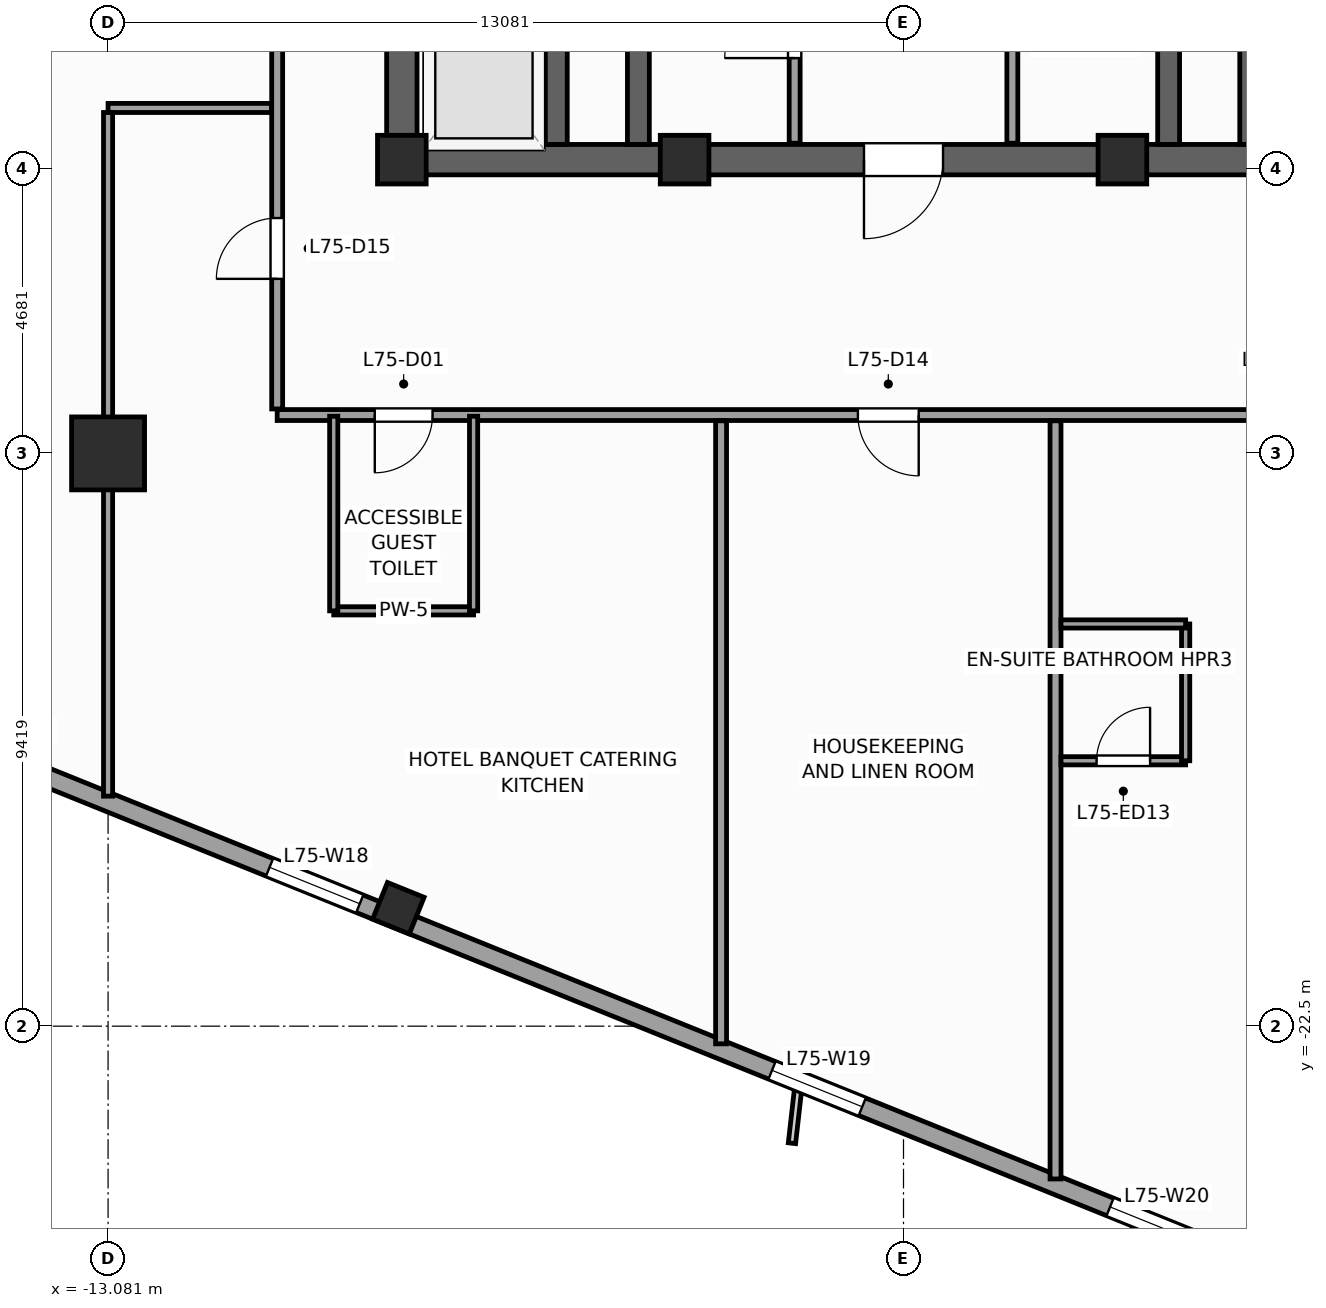
"""IFC4 building model, lengths in metres.
Left out: names, types, materials, properties, quantities, classifications, styles, units other than length and angle.
Written with IfcOpenShell. Run it as: python <this file> out.ifc"""

import sys

from ifc_helpers import new_model, si_unit, direction, frame, frame_2d, origin, origin_2d, place, context, subcontext, project, spatial, rectangle, extrude, source, transform, mapped, element, fill, save


model = new_model("IFC4")
c1 = context("Model", 3, precision=1e-05, world=origin(), true_north=direction((0.0, 1.0)))
c2 = subcontext(c1, "Body", "Model", "MODEL_VIEW")
j1 = project(units=[si_unit("LENGTHUNIT", "METRE"), si_unit("PLANEANGLEUNIT", "RADIAN")], contexts=[c1])
p1 = place(None, origin())
s1 = spatial("IfcSite", under=j1, at=p1, CompositionType="ELEMENT")
p2 = place(p1, origin())
s2 = spatial("IfcBuilding", under=s1, at=p2, CompositionType="ELEMENT")
p3 = place(p2, frame((0.0, 0.0, 304.8)))
s3 = spatial("IfcBuildingStorey", under=s2, at=p3, CompositionType="ELEMENT", Elevation=304.8)
p4 = place(p3, frame((-8.5, -8.25, 0.0), z_axis=(0.0, 0.0, 1.0), x_axis=(1.0, 0.0, 0.0)))
e1 = element("IfcWall", 1, at=p4, inside=s3, PredefinedType="SHEAR", context=c2, shape_type="SweptSolid", body=[
    extrude(rectangle(XDim=17.0, YDim=0.5, at=frame_2d((8.5, 0.0))), origin(), (0.0, 0.0, 1.0), 3.6),
])
p5 = place(p4, frame((7.85, 0.0, 0.0)))
e2 = element("IfcOpeningElement", 2, at=p5, cuts=e1, PredefinedType="OPENING", context=c2, shape_type="SweptSolid", body=[
    extrude(rectangle(XDim=1.3, YDim=2.2, at=frame_2d((0.65, 1.1))), frame((0.0, 0.26, 0.0), z_axis=(0.0, -1.0, 0.0), x_axis=(1.0, 0.0, 0.0)), (0.0, 0.0, 1.0), 0.52),
])
p6 = place(p3, frame((-8.25, -8.0, 0.0), z_axis=(0.0, 0.0, 1.0), x_axis=(0.0, 1.0, 0.0)))
e3 = element("IfcWall", 3, at=p6, inside=s3, PredefinedType="SHEAR", context=c2, shape_type="SweptSolid", body=[
    extrude(rectangle(XDim=16.0, YDim=0.5, at=frame_2d((8.0, 0.0))), origin(), (0.0, 0.0, 1.0), 3.6),
])
p7 = place(p6, frame((4.69, 0.0, 0.0)))
e4 = element("IfcOpeningElement", 4, at=p7, cuts=e3, PredefinedType="OPENING", context=c2, shape_type="SweptSolid", body=[
    extrude(rectangle(XDim=1.3, YDim=2.2, at=frame_2d((0.65, 1.1))), frame((0.0, 0.26, 0.0), z_axis=(0.0, -1.0, 0.0), x_axis=(1.0, 0.0, 0.0)), (0.0, 0.0, 1.0), 0.52),
])
for number, where, z_axis, x_axis in (
    (5, (-4.36, -8.0, 0.0), (0.0, 0.0, 1.0), (0.0, 1.0, 0.0)),
    (6, (4.36, -8.0, 0.0), (0.0, 0.0, 1.0), (0.0, 1.0, 0.0)),
):
    element("IfcWall", number, at=place(p3, frame(where, z_axis=z_axis, x_axis=x_axis)), inside=s3, PredefinedType="SHEAR", context=c2, shape_type="SweptSolid", body=[
        extrude(rectangle(XDim=16.0, YDim=0.36, at=frame_2d((8.0, 0.0))), origin(), (0.0, 0.0, 1.0), 3.6),
    ])
for number, where, z_axis, x_axis in (
    (7, (-5.71, -8.0, 0.0), (0.0, 0.0, 1.0), (0.0, 1.0, 0.0)),
    (8, (5.71, -8.0, 0.0), (0.0, 0.0, 1.0), (0.0, 1.0, 0.0)),
):
    element("IfcWall", number, at=place(p3, frame(where, z_axis=z_axis, x_axis=x_axis)), inside=s3, PredefinedType="SHEAR", context=c2, shape_type="SweptSolid", body=[
        extrude(rectangle(XDim=2.54, YDim=0.36, at=frame_2d((1.27, 0.0))), origin(), (0.0, 0.0, 1.0), 3.6),
    ])
m1 = source(origin(), c2, "Body", "SweptSolid", [
    extrude(rectangle(XDim=0.8, YDim=0.8, at=origin_2d()), origin(), (0.0, 0.0, 1.0), 3.6),
])
for number, where, z_axis, x_axis in (
    (9, (-8.25, -8.25, 0.0), (0.0, 0.0, 1.0), (1.0, 0.0, 0.0)),
    (10, (-3.6, -8.25, 0.0), (0.0, 0.0, 1.0), (1.0, 0.0, 0.0)),
    (11, (3.6, -8.25, 0.0), (0.0, 0.0, 1.0), (1.0, 0.0, 0.0)),
):
    element("IfcColumn", number, at=place(p3, frame(where, z_axis=z_axis, x_axis=x_axis)), inside=s3, PredefinedType="PILASTER", context=c2, shape_type="MappedRepresentation", body=[
        mapped(m1, transform((0.0, 0.0, 0.0), scale=1.0)),
    ])
m2 = source(origin(), c2, "Body", "SweptSolid", [
    extrude(rectangle(XDim=1.2, YDim=1.2, at=origin_2d()), origin(), (0.0, 0.0, 1.0), 3.6),
])
p8 = place(p3, frame((-13.081, -13.081, 0.0), z_axis=(0.0, 0.0, 1.0), x_axis=(1.0, 0.0, 0.0)))
e12 = element("IfcColumn", 12, at=p8, inside=s3, PredefinedType="COLUMN", context=c2, shape_type="MappedRepresentation", body=[
    mapped(m2, transform((0.0, 0.0, 0.0), scale=1.0)),
])
m3 = source(origin(), c2, "Body", "SweptSolid", [
    extrude(rectangle(XDim=0.65, YDim=0.65, at=origin_2d()), origin(), (0.0, 0.0, 1.0), 3.6),
])
p9 = place(p3, frame((-8.307, -20.56, 0.0), z_axis=(0.0, 0.0, 1.0), x_axis=(0.374606593416, 0.927183854567, 0.0)))
e13 = element("IfcColumn", 13, at=p9, inside=s3, PredefinedType="COLUMN", context=c2, shape_type="MappedRepresentation", body=[
    mapped(m3, transform((0.0, 0.0, 0.0), scale=1.0)),
])
p10 = place(p3, frame((-23.813, -14.479, 0.0), z_axis=(0.0, 0.0, 1.0), x_axis=(0.927182657188, -0.374609557019, 0.0)))
e14 = element("IfcWall", 14, at=p10, inside=s3, PredefinedType="STANDARD", context=c2, shape_type="SweptSolid", body=[
    extrude(rectangle(XDim=33.31, YDim=0.31, at=frame_2d((16.655, 0.0))), origin(), (0.0, 0.0, 1.0), 2.75),
])
p11 = place(p10, frame((3.197, 0.0, 0.47)))
e15 = element("IfcOpeningElement", 15, at=p11, cuts=e14, PredefinedType="OPENING", context=c2, shape_type="SweptSolid", body=[
    extrude(rectangle(XDim=1.6, YDim=2.1, at=frame_2d((0.8, 1.05))), frame((0.0, 0.165, 0.0), z_axis=(0.0, -1.0, 0.0), x_axis=(1.0, 0.0, 0.0)), (0.0, 0.0, 1.0), 0.33),
])
p12 = place(p10, frame((8.86, 0.0, 0.47)))
e16 = element("IfcOpeningElement", 16, at=p12, cuts=e14, PredefinedType="OPENING", context=c2, shape_type="SweptSolid", body=[
    extrude(rectangle(XDim=1.6, YDim=2.1, at=frame_2d((0.8, 1.05))), frame((0.0, 0.165, 0.0), z_axis=(0.0, -1.0, 0.0), x_axis=(1.0, 0.0, 0.0)), (0.0, 0.0, 1.0), 0.33),
])
p13 = place(p10, frame((14.439, 0.0, 0.47)))
e17 = element("IfcOpeningElement", 17, at=p13, cuts=e14, PredefinedType="OPENING", context=c2, shape_type="SweptSolid", body=[
    extrude(rectangle(XDim=1.6, YDim=2.1, at=frame_2d((0.8, 1.05))), frame((0.0, 0.165, 0.0), z_axis=(0.0, -1.0, 0.0), x_axis=(1.0, 0.0, 0.0)), (0.0, 0.0, 1.0), 0.33),
])
p14 = place(p10, frame((23.351, 0.0, 0.47)))
e18 = element("IfcOpeningElement", 18, at=p14, cuts=e14, PredefinedType="OPENING", context=c2, shape_type="SweptSolid", body=[
    extrude(rectangle(XDim=1.6, YDim=2.1, at=frame_2d((0.8, 1.05))), frame((0.0, 0.165, 0.0), z_axis=(0.0, -1.0, 0.0), x_axis=(1.0, 0.0, 0.0)), (0.0, 0.0, 1.0), 0.33),
])
p15 = place(p10, frame((29.347, 0.0, 0.47)))
e19 = element("IfcOpeningElement", 19, at=p15, cuts=e14, PredefinedType="OPENING", context=c2, shape_type="SweptSolid", body=[
    extrude(rectangle(XDim=1.6, YDim=2.1, at=frame_2d((0.8, 1.05))), frame((0.0, 0.165, 0.0), z_axis=(0.0, -1.0, 0.0), x_axis=(1.0, 0.0, 0.0)), (0.0, 0.0, 1.0), 0.33),
])
p16 = place(p3, frame((-1.79, -7.98, 0.0), z_axis=(0.0, 0.0, 1.0), x_axis=(0.0, 1.0, 0.0)))
e20 = element("IfcWall", 20, at=p16, inside=s3, PredefinedType="PARTITIONING", context=c2, shape_type="SweptSolid", body=[
    extrude(rectangle(XDim=12.38, YDim=0.18, at=frame_2d((6.19, 0.0))), origin(), (0.0, 0.0, 1.0), 3.35),
])
p17 = place(p16, frame((8.8, 0.0, 0.0)))
e21 = element("IfcOpeningElement", 21, at=p17, cuts=e20, PredefinedType="OPENING", context=c2, shape_type="SweptSolid", body=[
    extrude(rectangle(XDim=1.1, YDim=2.2, at=frame_2d((0.55, 1.1))), frame((0.0, 0.1, 0.0), z_axis=(0.0, -1.0, 0.0), x_axis=(1.0, 0.0, 0.0)), (0.0, 0.0, 1.0), 0.2),
])
p18 = place(p16, frame((10.86, 0.0, 0.0)))
e22 = element("IfcOpeningElement", 22, at=p18, cuts=e20, PredefinedType="OPENING", context=c2, shape_type="SweptSolid", body=[
    extrude(rectangle(XDim=1.1, YDim=2.2, at=frame_2d((0.55, 1.1))), frame((0.0, 0.1, 0.0), z_axis=(0.0, -1.0, 0.0), x_axis=(1.0, 0.0, 0.0)), (0.0, 0.0, 1.0), 0.2),
])
p19 = place(p16, frame((1.4, 0.0, 0.0)))
e23 = element("IfcOpeningElement", 23, at=p19, cuts=e20, PredefinedType="OPENING", context=c2, shape_type="SweptSolid", body=[
    extrude(rectangle(XDim=1.15, YDim=2.25, at=frame_2d((0.575, 1.125))), frame((0.0, 0.1, 0.0), z_axis=(0.0, -1.0, 0.0), x_axis=(1.0, 0.0, 0.0)), (0.0, 0.0, 1.0), 0.2),
])
p20 = place(p16, frame((5.6, 0.0, 0.0)))
e24 = element("IfcOpeningElement", 24, at=p20, cuts=e20, PredefinedType="OPENING", context=c2, shape_type="SweptSolid", body=[
    extrude(rectangle(XDim=1.15, YDim=2.25, at=frame_2d((0.575, 1.125))), frame((0.0, 0.1, 0.0), z_axis=(0.0, -1.0, 0.0), x_axis=(1.0, 0.0, 0.0)), (0.0, 0.0, 1.0), 0.2),
])
p21 = place(p3, frame((1.79, -7.98, 0.0), z_axis=(0.0, 0.0, 1.0), x_axis=(0.0, 1.0, 0.0)))
e25 = element("IfcWall", 25, at=p21, inside=s3, PredefinedType="PARTITIONING", context=c2, shape_type="SweptSolid", body=[
    extrude(rectangle(XDim=12.38, YDim=0.18, at=frame_2d((6.19, 0.0))), origin(), (0.0, 0.0, 1.0), 3.35),
])
p22 = place(p21, frame((8.8, 0.0, 0.0)))
e26 = element("IfcOpeningElement", 26, at=p22, cuts=e25, PredefinedType="OPENING", context=c2, shape_type="SweptSolid", body=[
    extrude(rectangle(XDim=1.1, YDim=2.2, at=frame_2d((0.55, 1.1))), frame((0.0, 0.1, 0.0), z_axis=(0.0, -1.0, 0.0), x_axis=(1.0, 0.0, 0.0)), (0.0, 0.0, 1.0), 0.2),
])
p23 = place(p21, frame((10.86, 0.0, 0.0)))
e27 = element("IfcOpeningElement", 27, at=p23, cuts=e25, PredefinedType="OPENING", context=c2, shape_type="SweptSolid", body=[
    extrude(rectangle(XDim=1.1, YDim=2.2, at=frame_2d((0.55, 1.1))), frame((0.0, 0.1, 0.0), z_axis=(0.0, -1.0, 0.0), x_axis=(1.0, 0.0, 0.0)), (0.0, 0.0, 1.0), 0.2),
])
p24 = place(p21, frame((3.5, 0.0, 0.0)))
e28 = element("IfcOpeningElement", 28, at=p24, cuts=e25, PredefinedType="OPENING", context=c2, shape_type="SweptSolid", body=[
    extrude(rectangle(XDim=1.15, YDim=2.25, at=frame_2d((0.575, 1.125))), frame((0.0, 0.1, 0.0), z_axis=(0.0, -1.0, 0.0), x_axis=(1.0, 0.0, 0.0)), (0.0, 0.0, 1.0), 0.2),
])
p25 = place(p3, frame((-10.3, -12.45, 0.0), z_axis=(0.0, 0.0, 1.0), x_axis=(1.0, 0.0, 0.0)))
e29 = element("IfcWall", 29, at=p25, inside=s3, PredefinedType="PARTITIONING", context=c2, shape_type="SweptSolid", body=[
    extrude(rectangle(XDim=20.6, YDim=0.18, at=frame_2d((10.3, 0.0))), origin(), (0.0, 0.0, 1.0), 3.35),
])
p26 = place(p25, frame((1.605, 0.0, 0.0)))
e30 = element("IfcOpeningElement", 30, at=p26, cuts=e29, PredefinedType="OPENING", context=c2, shape_type="SweptSolid", body=[
    extrude(rectangle(XDim=0.95, YDim=2.1, at=frame_2d((0.475, 1.05))), frame((0.0, 0.1, 0.0), z_axis=(0.0, -1.0, 0.0), x_axis=(1.0, 0.0, 0.0)), (0.0, 0.0, 1.0), 0.2),
])
p27 = place(p25, frame((16.036, 0.0, 0.0)))
e31 = element("IfcOpeningElement", 31, at=p27, cuts=e29, PredefinedType="OPENING", context=c2, shape_type="SweptSolid", body=[
    extrude(rectangle(XDim=1.0, YDim=2.15, at=frame_2d((0.5, 1.075))), frame((0.0, 0.1, 0.0), z_axis=(0.0, -1.0, 0.0), x_axis=(1.0, 0.0, 0.0)), (0.0, 0.0, 1.0), 0.2),
])
p28 = place(p25, frame((9.55, 0.0, 0.0)))
e32 = element("IfcOpeningElement", 32, at=p28, cuts=e29, PredefinedType="OPENING", context=c2, shape_type="SweptSolid", body=[
    extrude(rectangle(XDim=1.0, YDim=2.15, at=frame_2d((0.5, 1.075))), frame((0.0, 0.1, 0.0), z_axis=(0.0, -1.0, 0.0), x_axis=(1.0, 0.0, 0.0)), (0.0, 0.0, 1.0), 0.2),
])
p29 = place(p3, frame((-10.3, -12.35, 0.0), z_axis=(0.0, 0.0, 1.0), x_axis=(0.0, 1.0, 0.0)))
e33 = element("IfcWall", 33, at=p29, inside=s3, PredefinedType="PARTITIONING", context=c2, shape_type="SweptSolid", body=[
    extrude(rectangle(XDim=24.7, YDim=0.18, at=frame_2d((12.35, 0.0))), origin(), (0.0, 0.0, 1.0), 3.35),
])
p30 = place(p29, frame((16.15, 0.0, 0.0)))
e34 = element("IfcOpeningElement", 34, at=p30, cuts=e33, PredefinedType="OPENING", context=c2, shape_type="SweptSolid", body=[
    extrude(rectangle(XDim=1.0, YDim=2.15, at=frame_2d((0.5, 1.075))), frame((0.0, 0.1, 0.0), z_axis=(0.0, -1.0, 0.0), x_axis=(1.0, 0.0, 0.0)), (0.0, 0.0, 1.0), 0.2),
])
p31 = place(p29, frame((2.139, 0.0, 0.0)))
e35 = element("IfcOpeningElement", 35, at=p31, cuts=e33, PredefinedType="OPENING", context=c2, shape_type="SweptSolid", body=[
    extrude(rectangle(XDim=1.0, YDim=2.15, at=frame_2d((0.5, 1.075))), frame((0.0, 0.1, 0.0), z_axis=(0.0, -1.0, 0.0), x_axis=(1.0, 0.0, 0.0)), (0.0, 0.0, 1.0), 0.2),
])
p32 = place(p29, frame((6.35, 0.0, 0.0)))
e36 = element("IfcOpeningElement", 36, at=p32, cuts=e33, PredefinedType="OPENING", context=c2, shape_type="SweptSolid", body=[
    extrude(rectangle(XDim=1.0, YDim=2.15, at=frame_2d((0.5, 1.075))), frame((0.0, 0.1, 0.0), z_axis=(0.0, -1.0, 0.0), x_axis=(1.0, 0.0, 0.0)), (0.0, 0.0, 1.0), 0.2),
])
p33 = place(p29, frame((10.65, 0.0, 0.0)))
e37 = element("IfcOpeningElement", 37, at=p33, cuts=e33, PredefinedType="OPENING", context=c2, shape_type="SweptSolid", body=[
    extrude(rectangle(XDim=1.0, YDim=2.15, at=frame_2d((0.5, 1.075))), frame((0.0, 0.1, 0.0), z_axis=(0.0, -1.0, 0.0), x_axis=(1.0, 0.0, 0.0)), (0.0, 0.0, 1.0), 0.2),
])
p34 = place(p3, frame((2.5, -12.545, 0.0), z_axis=(0.0, 0.0, 1.0), x_axis=(0.0, -1.0, 0.0)))
e38 = element("IfcWall", 38, at=p34, inside=s3, PredefinedType="PARTITIONING", context=c2, shape_type="SweptSolid", body=[
    extrude(rectangle(XDim=12.468, YDim=0.18, at=frame_2d((6.234, 0.0))), origin(), (0.0, 0.0, 1.0), 3.02),
])
p35 = place(p3, frame((-3.0, -12.545, 0.0), z_axis=(0.0, 0.0, 1.0), x_axis=(0.0, -1.0, 0.0)))
e39 = element("IfcWall", 39, at=p35, inside=s3, PredefinedType="PARTITIONING", context=c2, shape_type="SweptSolid", body=[
    extrude(rectangle(XDim=10.246, YDim=0.18, at=frame_2d((5.123, 0.0))), origin(), (0.0, 0.0, 1.0), 3.02),
])
p36 = place(p3, frame((-10.395, -7.4, 0.0), z_axis=(0.0, 0.0, 1.0), x_axis=(-1.0, 0.0, 0.0)))
e40 = element("IfcWall", 40, at=p36, inside=s3, PredefinedType="PARTITIONING", context=c2, shape_type="SweptSolid", body=[
    extrude(rectangle(XDim=2.686, YDim=0.15, at=frame_2d((1.343, 0.0))), origin(), (0.0, 0.0, 1.0), 3.35),
])
p37 = place(p3, frame((-13.081, -7.475, 0.0), z_axis=(0.0, 0.0, 1.0), x_axis=(0.0, -1.0, 0.0)))
e41 = element("IfcWall", 41, at=p37, inside=s3, PredefinedType="PARTITIONING", context=c2, shape_type="SweptSolid", body=[
    extrude(rectangle(XDim=11.243, YDim=0.15, at=frame_2d((5.621, 0.0))), origin(), (0.0, 0.0, 1.0), 2.45),
])
p38 = place(p3, frame((-9.37, -15.67, 0.0), z_axis=(0.0, 0.0, 1.0), x_axis=(1.0, 0.0, 0.0)))
e42 = element("IfcWall", 42, at=p38, inside=s3, PredefinedType="PARTITIONING", context=c2, shape_type="SweptSolid", body=[
    extrude(rectangle(XDim=2.3, YDim=0.135, at=frame_2d((1.15, 0.0))), origin(), (0.0, 0.0, 1.0), 2.95),
])
for number, where, z_axis, x_axis in (
    (43, (-7.07, -15.67, 0.0), (0.0, 0.0, 1.0), (0.0, 1.0, 0.0)),
    (44, (-9.37, -15.67, 0.0), (0.0, 0.0, 1.0), (0.0, 1.0, 0.0)),
):
    element("IfcWall", number, at=place(p3, frame(where, z_axis=z_axis, x_axis=x_axis)), inside=s3, PredefinedType="PARTITIONING", context=c2, shape_type="SweptSolid", body=[
        extrude(rectangle(XDim=3.2, YDim=0.135, at=frame_2d((1.6, 0.0))), origin(), (0.0, 0.0, 1.0), 3.35),
    ])
p39 = place(p3, frame((2.59, -18.136, 0.0), z_axis=(0.0, 0.0, 1.0), x_axis=(1.0, 0.0, 0.0)))
e45 = element("IfcWall", 45, at=p39, inside=s3, PredefinedType="PARTITIONING", context=c2, shape_type="SweptSolid", body=[
    extrude(rectangle(XDim=2.05, YDim=0.135, at=frame_2d((1.025, 0.0))), origin(), (0.0, 0.0, 1.0), 3.35),
])
p40 = place(p39, frame((0.585, 0.0, 0.0)))
e46 = element("IfcOpeningElement", 46, at=p40, cuts=e45, PredefinedType="OPENING", context=c2, shape_type="SweptSolid", body=[
    extrude(rectangle(XDim=0.88, YDim=2.1, at=frame_2d((0.44, 1.05))), frame((0.0, 0.078, 0.0), z_axis=(0.0, -1.0, 0.0), x_axis=(1.0, 0.0, 0.0)), (0.0, 0.0, 1.0), 0.155),
])
p41 = place(p3, frame((4.64, -18.136, 0.0), z_axis=(0.0, 0.0, 1.0), x_axis=(0.0, 1.0, 0.0)))
e47 = element("IfcWall", 47, at=p41, inside=s3, PredefinedType="PARTITIONING", context=c2, shape_type="SweptSolid", body=[
    extrude(rectangle(XDim=2.25, YDim=0.135, at=frame_2d((1.125, 0.0))), origin(), (0.0, 0.0, 1.0), 3.35),
])
p42 = place(p3, frame((2.59, -15.886, 0.0), z_axis=(0.0, 0.0, 1.0), x_axis=(1.0, 0.0, 0.0)))
e48 = element("IfcWall", 48, at=p42, inside=s3, PredefinedType="PARTITIONING", context=c2, shape_type="SweptSolid", body=[
    extrude(rectangle(XDim=2.05, YDim=0.135, at=frame_2d((1.025, 0.0))), origin(), (0.0, 0.0, 1.0), 3.35),
])
m4 = source(origin(), c2, "Body", "SweptSolid", [
    extrude(rectangle(XDim=1.6, YDim=2.1, at=frame_2d((0.8, 1.05))), frame((0.0, 0.03, 0.0), z_axis=(0.0, -1.0, 0.0), x_axis=(1.0, 0.0, 0.0)), (0.0, 0.0, 1.0), 0.06),
])
p43 = place(p13, origin())
e49 = element("IfcWindow", 49, at=p43, inside=s3, PartitioningType="SINGLE_PANEL", PredefinedType="WINDOW", context=c2, shape_type="MappedRepresentation", body=[
    mapped(m4, transform((0.0, 0.0, 0.0), scale=1.0)),
])
fill(e17, e49)
p44 = place(p14, origin())
e50 = element("IfcWindow", 50, at=p44, inside=s3, PartitioningType="SINGLE_PANEL", PredefinedType="WINDOW", context=c2, shape_type="MappedRepresentation", body=[
    mapped(m4, transform((0.0, 0.0, 0.0), scale=1.0)),
])
fill(e18, e50)
p45 = place(p15, origin())
e51 = element("IfcWindow", 51, at=p45, inside=s3, PartitioningType="SINGLE_PANEL", PredefinedType="WINDOW", context=c2, shape_type="MappedRepresentation", body=[
    mapped(m4, transform((0.0, 0.0, 0.0), scale=1.0)),
])
fill(e19, e51)
m5 = source(origin(), c2, "Body", "SweptSolid", [
    extrude(rectangle(XDim=1.3, YDim=2.2, at=frame_2d((0.65, 1.1))), frame((0.0, 0.025, 0.0), z_axis=(0.0, -1.0, 0.0), x_axis=(1.0, 0.0, 0.0)), (0.0, 0.0, 1.0), 0.05),
])
p46 = place(p5, frame((1.3, 0.0, 0.0), z_axis=(0.0, 0.0, 1.0), x_axis=(-1.0, 0.0, 0.0)))
e52 = element("IfcDoor", 52, at=p46, inside=s3, OperationType="SINGLE_SWING_LEFT", PredefinedType="DOOR", context=c2, shape_type="MappedRepresentation", body=[
    mapped(m5, transform((0.0, 0.0, 0.0), scale=1.0)),
])
fill(e2, e52)
m6 = source(origin(), c2, "Body", "SweptSolid", [
    extrude(rectangle(XDim=1.15, YDim=2.25, at=frame_2d((0.575, 1.125))), frame((0.0, 0.025, 0.0), z_axis=(0.0, -1.0, 0.0), x_axis=(1.0, 0.0, 0.0)), (0.0, 0.0, 1.0), 0.05),
])
p47 = place(p19, origin())
e53 = element("IfcDoor", 53, at=p47, inside=s3, OperationType="SINGLE_SWING_LEFT", PredefinedType="DOOR", context=c2, shape_type="MappedRepresentation", body=[
    mapped(m6, transform((0.0, 0.0, 0.0), scale=1.0)),
])
fill(e23, e53)
m7 = source(origin(), c2, "Body", "SweptSolid", [
    extrude(rectangle(XDim=0.95, YDim=2.1, at=frame_2d((0.475, 1.05))), frame((0.0, 0.025, 0.0), z_axis=(0.0, -1.0, 0.0), x_axis=(1.0, 0.0, 0.0)), (0.0, 0.0, 1.0), 0.05),
])
p48 = place(p26, frame((0.95, 0.0, 0.0), z_axis=(0.0, 0.0, 1.0), x_axis=(-1.0, 0.0, 0.0)))
e54 = element("IfcDoor", 54, at=p48, inside=s3, OperationType="SINGLE_SWING_LEFT", PredefinedType="DOOR", context=c2, shape_type="MappedRepresentation", body=[
    mapped(m7, transform((0.0, 0.0, 0.0), scale=1.0)),
])
fill(e30, e54)
m8 = source(origin(), c2, "Body", "SweptSolid", [
    extrude(rectangle(XDim=0.88, YDim=2.1, at=frame_2d((0.44, 1.05))), frame((0.0, 0.025, 0.0), z_axis=(0.0, -1.0, 0.0), x_axis=(1.0, 0.0, 0.0)), (0.0, 0.0, 1.0), 0.05),
])
p49 = place(p40, origin())
e55 = element("IfcDoor", 55, at=p49, inside=s3, OperationType="SINGLE_SWING_RIGHT", PredefinedType="DOOR", context=c2, shape_type="MappedRepresentation", body=[
    mapped(m8, transform((0.0, 0.0, 0.0), scale=1.0)),
])
fill(e46, e55)
m9 = source(origin(), c2, "Body", "SweptSolid", [
    extrude(rectangle(XDim=1.0, YDim=2.15, at=frame_2d((0.5, 1.075))), frame((0.0, 0.025, 0.0), z_axis=(0.0, -1.0, 0.0), x_axis=(1.0, 0.0, 0.0)), (0.0, 0.0, 1.0), 0.05),
])
p50 = place(p28, frame((1.0, 0.0, 0.0), z_axis=(0.0, 0.0, 1.0), x_axis=(-1.0, 0.0, 0.0)))
e56 = element("IfcDoor", 56, at=p50, inside=s3, OperationType="SINGLE_SWING_RIGHT", PredefinedType="DOOR", context=c2, shape_type="MappedRepresentation", body=[
    mapped(m9, transform((0.0, 0.0, 0.0), scale=1.0)),
])
fill(e32, e56)
p51 = place(p31, origin())
e57 = element("IfcDoor", 57, at=p51, inside=s3, OperationType="SINGLE_SWING_LEFT", PredefinedType="DOOR", context=c2, shape_type="MappedRepresentation", body=[
    mapped(m9, transform((0.0, 0.0, 0.0), scale=1.0)),
])
fill(e35, e57)
save(model, sys.argv[1])
